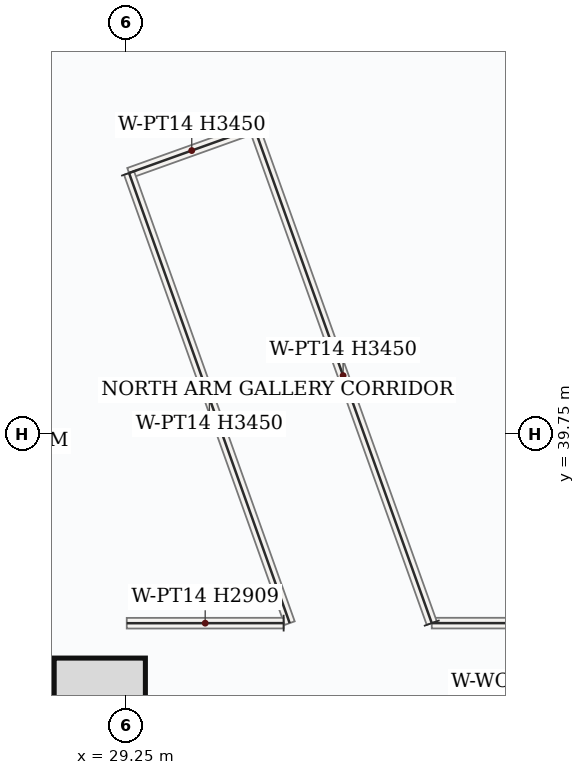
"""IFC4 building model, lengths in metres.
Left out: names, types, materials, properties, quantities, classifications, styles, units other than length and angle.
Written with IfcOpenShell. Run it as: python <this file> out.ifc"""

import sys

from ifc_helpers import new_model, si_unit, direction, frame, frame_2d, origin, origin_2d, place, context, subcontext, project, spatial, rectangle, extrude, source, transform, mapped, element, save


model = new_model("IFC4")
c1 = context("Model", 3, precision=1e-05, world=origin(), true_north=direction((0.0, 1.0)))
c2 = subcontext(c1, "Body", "Model", "MODEL_VIEW")
j1 = project(units=[si_unit("LENGTHUNIT", "METRE"), si_unit("PLANEANGLEUNIT", "RADIAN")], contexts=[c1])
p1 = place(None, origin())
s1 = spatial("IfcSite", under=j1, at=p1, CompositionType="ELEMENT")
p2 = place(p1, origin())
s2 = spatial("IfcBuilding", under=s1, at=p2, CompositionType="ELEMENT")
p3 = place(p2, frame((0.0, 0.0, 225.3)))
s3 = spatial("IfcBuildingStorey", under=s2, at=p3, CompositionType="ELEMENT", Elevation=225.3)
p4 = place(p3, frame((29.0, 28.05, 0.0), z_axis=(0.0, 0.0, 1.0), x_axis=(0.0, 1.0, 0.0)))
e1 = element("IfcWall", 1, at=p4, inside=s3, PredefinedType="SHEAR", context=c2, shape_type="SweptSolid", body=[
    extrude(rectangle(XDim=8.55, YDim=0.5, at=frame_2d((4.275, 0.0))), origin(), (0.0, 0.0, 1.0), 3.45),
])
p5 = place(p4, frame((1.5, 0.0, 0.0)))
e2 = element("IfcOpeningElement", 2, at=p5, cuts=e1, PredefinedType="OPENING", context=c2, shape_type="SweptSolid", body=[
    extrude(rectangle(XDim=1.1, YDim=2.2, at=frame_2d((0.55, 1.1))), frame((0.0, 0.26, 0.0), z_axis=(0.0, -1.0, 0.0), x_axis=(1.0, 0.0, 0.0)), (0.0, 0.0, 1.0), 0.52),
])
m1 = source(origin(), c2, "Body", "SweptSolid", [
    extrude(rectangle(XDim=7.0, YDim=0.5, at=frame_2d((3.5, 0.0))), origin(), (0.0, 0.0, 1.0), 3.45),
])
p6 = place(p3, frame((21.75, 36.35, 0.0), z_axis=(0.0, 0.0, 1.0), x_axis=(1.0, 0.0, 0.0)))
e3 = element("IfcWall", 3, at=p6, inside=s3, PredefinedType="SHEAR", context=c2, shape_type="MappedRepresentation", body=[
    mapped(m1, transform((0.0, 0.0, 0.0), x_axis=(1.0, 0.0, 0.0), y_axis=(0.0, 1.0, 0.0), z_axis=(0.0, 0.0, 1.0), scale=1.0)),
])
m2 = source(origin(), c2, "Body", "SweptSolid", [
    extrude(rectangle(XDim=1.2, YDim=1.2, at=origin_2d()), origin(), (0.0, 0.0, 1.0), 3.9),
])
p7 = place(p3, frame((28.9, 36.2, 0.0), z_axis=(0.0, 0.0, 1.0), x_axis=(1.0, 0.0, 0.0)))
e4 = element("IfcColumn", 4, at=p7, inside=s3, PredefinedType="COLUMN", context=c2, shape_type="MappedRepresentation", body=[
    mapped(m2, transform((0.0, 0.0, 0.0), x_axis=(1.0, 0.0, 0.0), y_axis=(0.0, 1.0, 0.0), z_axis=(0.0, 0.0, 1.0), scale=1.0)),
])
p8 = place(p3, frame((40.841, 37.26, 0.0), z_axis=(0.0, 0.0, 1.0), x_axis=(-1.0, 0.0, 0.0)))
e5 = element("IfcWall", 5, at=p8, inside=s3, PredefinedType="PARTITIONING", context=c2, shape_type="SweptSolid", body=[
    extrude(rectangle(XDim=7.573, YDim=0.14, at=frame_2d((3.787, 0.0))), origin(), (0.0, 0.0, 1.0), 3.45),
])
p9 = place(p8, frame((4.305, 0.0, 0.0)))
e6 = element("IfcOpeningElement", 6, at=p9, cuts=e5, PredefinedType="OPENING", context=c2, shape_type="SweptSolid", body=[
    extrude(rectangle(XDim=0.95, YDim=2.15, at=frame_2d((0.475, 1.075))), frame((0.0, 0.08, 0.0), z_axis=(0.0, -1.0, 0.0), x_axis=(1.0, 0.0, 0.0)), (0.0, 0.0, 1.0), 0.16),
])
m3 = source(origin(), c2, "Body", "SweptSolid", [
    extrude(rectangle(XDim=6.918, YDim=0.14, at=frame_2d((3.459, 0.0))), origin(), (0.0, 0.0, 1.0), 3.45),
])
p10 = place(p3, frame((33.268, 37.26, 0.0), z_axis=(0.0, 0.0, 1.0), x_axis=(-0.337208154994, 0.94143011435, 0.0)))
e7 = element("IfcWall", 7, at=p10, inside=s3, PredefinedType="PARTITIONING", context=c2, shape_type="MappedRepresentation", body=[
    mapped(m3, transform((0.0, 0.0, 0.0), x_axis=(1.0, 0.0, 0.0), y_axis=(0.0, 1.0, 0.0), z_axis=(0.0, 0.0, 1.0), scale=1.0)),
])
m4 = source(origin(), c2, "Body", "SweptSolid", [
    extrude(rectangle(XDim=1.753, YDim=0.14, at=frame_2d((0.876, 0.0))), origin(), (0.0, 0.0, 1.0), 3.45),
])
p11 = place(p3, frame((30.935, 43.773, 0.0), z_axis=(0.0, 0.0, 1.0), x_axis=(-0.941413691232, -0.337254002142, 0.0)))
e8 = element("IfcWall", 8, at=p11, inside=s3, PredefinedType="PARTITIONING", context=c2, shape_type="MappedRepresentation", body=[
    mapped(m4, transform((0.0, 0.0, 0.0), x_axis=(1.0, 0.0, 0.0), y_axis=(0.0, 1.0, 0.0), z_axis=(0.0, 0.0, 1.0), scale=1.0)),
])
m5 = source(origin(), c2, "Body", "SweptSolid", [
    extrude(rectangle(XDim=6.288, YDim=0.14, at=frame_2d((3.144, 0.0))), origin(), (0.0, 0.0, 1.0), 3.45),
])
p12 = place(p3, frame((29.285, 43.182, 0.0), z_axis=(0.0, 0.0, 1.0), x_axis=(0.336146986569, -0.941809536701, 0.0)))
e9 = element("IfcWall", 9, at=p12, inside=s3, PredefinedType="PARTITIONING", context=c2, shape_type="MappedRepresentation", body=[
    mapped(m5, transform((0.0, 0.0, 0.0), x_axis=(1.0, 0.0, 0.0), y_axis=(0.0, 1.0, 0.0), z_axis=(0.0, 0.0, 1.0), scale=1.0)),
])
m6 = source(origin(), c2, "Body", "SweptSolid", [
    extrude(rectangle(XDim=2.064, YDim=0.14, at=frame_2d((1.032, 0.0))), origin(), (0.0, 0.0, 1.0), 2.909),
])
p13 = place(p3, frame((31.319, 37.26, 0.0), z_axis=(0.0, 0.0, 1.0), x_axis=(-0.999999825102, -0.000591435903, 0.0)))
e10 = element("IfcWall", 10, at=p13, inside=s3, PredefinedType="PARTITIONING", context=c2, shape_type="MappedRepresentation", body=[
    mapped(m6, transform((0.0, 0.0, 0.0), x_axis=(1.0, 0.0, 0.0), y_axis=(0.0, 1.0, 0.0), z_axis=(0.0, 0.0, 1.0), scale=1.0)),
])
save(model, sys.argv[1])
